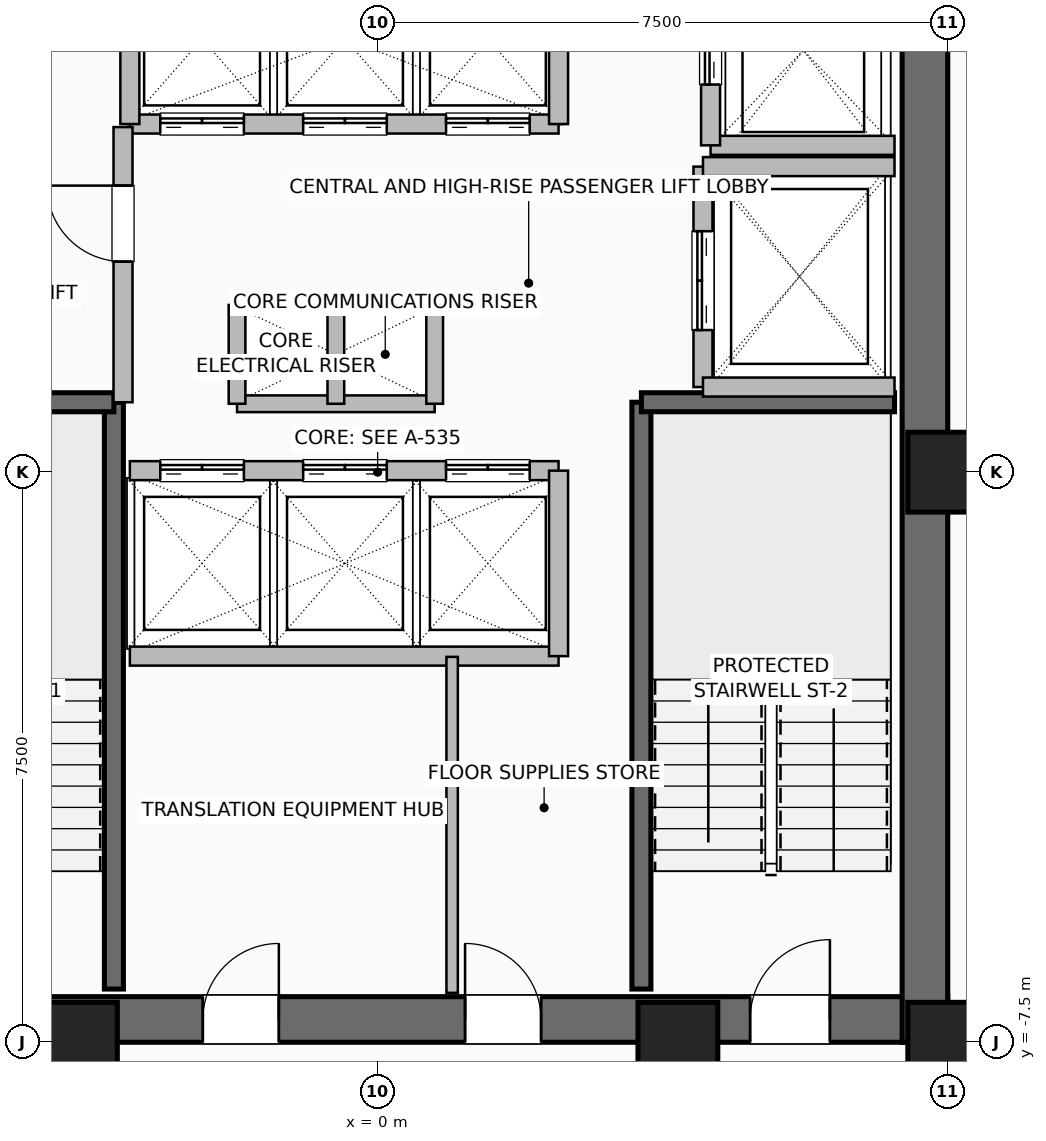
"""IFC4 building model, lengths in metres.
Left out: names, types, materials, properties, quantities, classifications, styles, units other than length and angle.
Written with IfcOpenShell. Run it as: python <this file> out.ifc"""

import sys

from ifc_helpers import new_model, si_unit, direction, frame, frame_2d, origin, origin_2d, place, context, subcontext, project, spatial, rectangle, hollow_rectangle, extrude, element, fill, save


model = new_model("IFC4")
c1 = context("Model", 3, precision=1e-05, world=origin(), true_north=direction((0.0, 1.0)))
c2 = subcontext(c1, "Body", "Model", "MODEL_VIEW")
j1 = project(units=[si_unit("LENGTHUNIT", "METRE"), si_unit("PLANEANGLEUNIT", "RADIAN")], contexts=[c1])
p1 = place(None, origin())
s1 = spatial("IfcSite", under=j1, at=p1, CompositionType="ELEMENT")
p2 = place(p1, origin())
s2 = spatial("IfcBuilding", under=s1, at=p2, CompositionType="ELEMENT")
p3 = place(p2, frame((0.0, 0.0, 133.6)))
s3 = spatial("IfcBuildingStorey", under=s2, at=p3, CompositionType="ELEMENT", Elevation=133.6)
for number, where, z_axis, x_axis in (
    (1, (-3.95, -7.5, 0.0), (0.0, 0.0, 1.0), (1.0, 0.0, 0.0)),
    (2, (3.95, -7.5, 0.0), (0.0, 0.0, 1.0), (1.0, 0.0, 0.0)),
    (3, (7.5, -7.5, 0.0), (0.0, 0.0, 1.0), (1.0, 0.0, 0.0)),
    (4, (7.5, 0.0, 0.0), (0.0, 0.0, 1.0), (1.0, 0.0, 0.0)),
):
    element("IfcColumn", number, at=place(p3, frame(where, z_axis=z_axis, x_axis=x_axis)), inside=s3, PredefinedType="COLUMN", context=c2, shape_type="SweptSolid", body=[
        extrude(hollow_rectangle(XDim=1.05, YDim=1.05, WallThickness=0.05, at=origin_2d()), origin(), (0.0, 0.0, 1.0), 3.6),
    ])
p4 = place(p3, frame((-7.5, -7.2, 0.0), z_axis=(0.0, 0.0, 1.0), x_axis=(1.0, 0.0, 0.0)))
e5 = element("IfcWall", 5, at=p4, inside=s3, PredefinedType="SHEAR", context=c2, shape_type="SweptSolid", body=[
    extrude(rectangle(XDim=15.0, YDim=0.6, at=frame_2d((7.5, 0.0))), origin(), (0.0, 0.0, 1.0), 3.36),
])
p5 = place(p4, frame((1.55, 0.0, 0.0)))
e6 = element("IfcOpeningElement", 6, at=p5, cuts=e5, PredefinedType="OPENING", context=c2, shape_type="SweptSolid", body=[
    extrude(rectangle(XDim=1.05, YDim=2.08, at=frame_2d((0.525, 1.04))), frame((0.0, 0.31, 0.0), z_axis=(0.0, -1.0, 0.0), x_axis=(1.0, 0.0, 0.0)), (0.0, 0.0, 1.0), 0.62),
])
p6 = place(p4, frame((12.4, 0.0, 0.0)))
e7 = element("IfcOpeningElement", 7, at=p6, cuts=e5, PredefinedType="OPENING", context=c2, shape_type="SweptSolid", body=[
    extrude(rectangle(XDim=1.05, YDim=2.08, at=frame_2d((0.525, 1.04))), frame((0.0, 0.31, 0.0), z_axis=(0.0, -1.0, 0.0), x_axis=(1.0, 0.0, 0.0)), (0.0, 0.0, 1.0), 0.62),
])
p7 = place(p4, frame((5.2, 0.0, 0.0)))
e8 = element("IfcOpeningElement", 8, at=p7, cuts=e5, PredefinedType="OPENING", context=c2, shape_type="SweptSolid", body=[
    extrude(rectangle(XDim=1.0, YDim=2.08, at=frame_2d((0.5, 1.04))), frame((0.0, 0.31, 0.0), z_axis=(0.0, -1.0, 0.0), x_axis=(1.0, 0.0, 0.0)), (0.0, 0.0, 1.0), 0.62),
])
p8 = place(p4, frame((8.65, 0.0, 0.0)))
e9 = element("IfcOpeningElement", 9, at=p8, cuts=e5, PredefinedType="OPENING", context=c2, shape_type="SweptSolid", body=[
    extrude(rectangle(XDim=1.0, YDim=2.08, at=frame_2d((0.5, 1.04))), frame((0.0, 0.31, 0.0), z_axis=(0.0, -1.0, 0.0), x_axis=(1.0, 0.0, 0.0)), (0.0, 0.0, 1.0), 0.62),
])
p9 = place(p3, frame((7.2, -7.5, 0.0), z_axis=(0.0, 0.0, 1.0), x_axis=(0.0, 1.0, 0.0)))
e10 = element("IfcWall", 10, at=p9, inside=s3, PredefinedType="SHEAR", context=c2, shape_type="SweptSolid", body=[
    extrude(rectangle(XDim=15.0, YDim=0.6, at=frame_2d((7.5, 0.0))), origin(), (0.0, 0.0, 1.0), 3.36),
])
p10 = place(p3, frame((-3.47, -6.8, 0.0), z_axis=(0.0, 0.0, 1.0), x_axis=(0.0, 1.0, 0.0)))
e11 = element("IfcWall", 11, at=p10, inside=s3, PredefinedType="SHEAR", context=c2, shape_type="SweptSolid", body=[
    extrude(rectangle(XDim=7.72, YDim=0.25, at=frame_2d((3.86, 0.0))), origin(), (0.0, 0.0, 1.0), 3.36),
])
p11 = place(p3, frame((-6.8, 0.92, 0.0), z_axis=(0.0, 0.0, 1.0), x_axis=(1.0, 0.0, 0.0)))
e12 = element("IfcWall", 12, at=p11, inside=s3, PredefinedType="SHEAR", context=c2, shape_type="SweptSolid", body=[
    extrude(rectangle(XDim=3.33, YDim=0.25, at=frame_2d((1.665, 0.0))), origin(), (0.0, 0.0, 1.0), 3.36),
])
p12 = place(p3, frame((3.47, -6.8, 0.0), z_axis=(0.0, 0.0, 1.0), x_axis=(0.0, 1.0, 0.0)))
e13 = element("IfcWall", 13, at=p12, inside=s3, PredefinedType="SHEAR", context=c2, shape_type="SweptSolid", body=[
    extrude(rectangle(XDim=7.72, YDim=0.25, at=frame_2d((3.86, 0.0))), origin(), (0.0, 0.0, 1.0), 3.36),
])
p13 = place(p3, frame((3.47, 0.92, 0.0), z_axis=(0.0, 0.0, 1.0), x_axis=(1.0, 0.0, 0.0)))
e14 = element("IfcWall", 14, at=p13, inside=s3, PredefinedType="SHEAR", context=c2, shape_type="SweptSolid", body=[
    extrude(rectangle(XDim=3.33, YDim=0.25, at=frame_2d((1.665, 0.0))), origin(), (0.0, 0.0, 1.0), 3.36),
])
for number, where, z_axis, x_axis in (
    (15, (-1.85, 2.2, 0.0), (0.0, 0.0, 1.0), (1.0, 0.0, 0.0)),
    (16, (-1.85, 0.9, 0.0), (0.0, 0.0, 1.0), (1.0, 0.0, 0.0)),
):
    element("IfcWall", number, at=place(p3, frame(where, z_axis=z_axis, x_axis=x_axis)), inside=s3, PredefinedType="PARTITIONING", context=c2, shape_type="SweptSolid", body=[
        extrude(rectangle(XDim=2.6, YDim=0.22, at=frame_2d((1.3, 0.0))), origin(), (0.0, 0.0, 1.0), 3.36),
    ])
for number, where, z_axis, x_axis in (
    (17, (-0.55, 0.9, 0.0), (0.0, 0.0, 1.0), (0.0, 1.0, 0.0)),
    (18, (0.75, 0.9, 0.0), (0.0, 0.0, 1.0), (0.0, 1.0, 0.0)),
    (19, (-1.85, 0.9, 0.0), (0.0, 0.0, 1.0), (0.0, 1.0, 0.0)),
):
    element("IfcWall", number, at=place(p3, frame(where, z_axis=z_axis, x_axis=x_axis)), inside=s3, PredefinedType="PARTITIONING", context=c2, shape_type="SweptSolid", body=[
        extrude(rectangle(XDim=1.3, YDim=0.22, at=frame_2d((0.65, 0.0))), origin(), (0.0, 0.0, 1.0), 3.36),
    ])
p14 = place(p3, frame((-3.26, 0.02, 0.0), z_axis=(0.0, 0.0, 1.0), x_axis=(1.0, 0.0, 0.0)))
e20 = element("IfcWall", 20, at=p14, inside=s3, PredefinedType="SHEAR", context=c2, shape_type="SweptSolid", body=[
    extrude(rectangle(XDim=5.64, YDim=0.25, at=frame_2d((2.82, 0.0))), origin(), (0.0, 0.0, 1.0), 3.36),
])
p15 = place(p14, frame((0.4, 0.0, 0.0)))
e21 = element("IfcOpeningElement", 21, at=p15, cuts=e20, PredefinedType="OPENING", context=c2, shape_type="SweptSolid", body=[
    extrude(rectangle(XDim=1.1, YDim=2.2, at=frame_2d((0.55, 1.1))), frame((0.0, 0.135, 0.0), z_axis=(0.0, -1.0, 0.0), x_axis=(1.0, 0.0, 0.0)), (0.0, 0.0, 1.0), 0.27),
])
p16 = place(p14, frame((2.28, 0.0, 0.0)))
e22 = element("IfcOpeningElement", 22, at=p16, cuts=e20, PredefinedType="OPENING", context=c2, shape_type="SweptSolid", body=[
    extrude(rectangle(XDim=1.1, YDim=2.2, at=frame_2d((0.55, 1.1))), frame((0.0, 0.135, 0.0), z_axis=(0.0, -1.0, 0.0), x_axis=(1.0, 0.0, 0.0)), (0.0, 0.0, 1.0), 0.27),
])
p17 = place(p14, frame((4.16, 0.0, 0.0)))
e23 = element("IfcOpeningElement", 23, at=p17, cuts=e20, PredefinedType="OPENING", context=c2, shape_type="SweptSolid", body=[
    extrude(rectangle(XDim=1.1, YDim=2.2, at=frame_2d((0.55, 1.1))), frame((0.0, 0.135, 0.0), z_axis=(0.0, -1.0, 0.0), x_axis=(1.0, 0.0, 0.0)), (0.0, 0.0, 1.0), 0.27),
])
p18 = place(p3, frame((-3.26, -2.42, 0.0), z_axis=(0.0, 0.0, 1.0), x_axis=(1.0, 0.0, 0.0)))
e24 = element("IfcWall", 24, at=p18, inside=s3, PredefinedType="SHEAR", context=c2, shape_type="SweptSolid", body=[
    extrude(rectangle(XDim=5.64, YDim=0.25, at=frame_2d((2.82, 0.0))), origin(), (0.0, 0.0, 1.0), 3.36),
])
p19 = place(p3, frame((2.38, -2.42, 0.0), z_axis=(0.0, 0.0, 1.0), x_axis=(0.0, 1.0, 0.0)))
e25 = element("IfcWall", 25, at=p19, inside=s3, PredefinedType="SHEAR", context=c2, shape_type="SweptSolid", body=[
    extrude(rectangle(XDim=2.44, YDim=0.25, at=frame_2d((1.22, 0.0))), origin(), (0.0, 0.0, 1.0), 3.36),
])
p20 = place(p3, frame((-3.26, 4.58, 0.0), z_axis=(0.0, 0.0, 1.0), x_axis=(1.0, 0.0, 0.0)))
e26 = element("IfcWall", 26, at=p20, inside=s3, PredefinedType="SHEAR", context=c2, shape_type="SweptSolid", body=[
    extrude(rectangle(XDim=5.64, YDim=0.25, at=frame_2d((2.82, 0.0))), origin(), (0.0, 0.0, 1.0), 3.36),
])
p21 = place(p20, frame((0.4, 0.0, 0.0)))
e27 = element("IfcOpeningElement", 27, at=p21, cuts=e26, PredefinedType="OPENING", context=c2, shape_type="SweptSolid", body=[
    extrude(rectangle(XDim=1.1, YDim=2.2, at=frame_2d((0.55, 1.1))), frame((0.0, 0.135, 0.0), z_axis=(0.0, -1.0, 0.0), x_axis=(1.0, 0.0, 0.0)), (0.0, 0.0, 1.0), 0.27),
])
p22 = place(p20, frame((2.28, 0.0, 0.0)))
e28 = element("IfcOpeningElement", 28, at=p22, cuts=e26, PredefinedType="OPENING", context=c2, shape_type="SweptSolid", body=[
    extrude(rectangle(XDim=1.1, YDim=2.2, at=frame_2d((0.55, 1.1))), frame((0.0, 0.135, 0.0), z_axis=(0.0, -1.0, 0.0), x_axis=(1.0, 0.0, 0.0)), (0.0, 0.0, 1.0), 0.27),
])
p23 = place(p20, frame((4.16, 0.0, 0.0)))
e29 = element("IfcOpeningElement", 29, at=p23, cuts=e26, PredefinedType="OPENING", context=c2, shape_type="SweptSolid", body=[
    extrude(rectangle(XDim=1.1, YDim=2.2, at=frame_2d((0.55, 1.1))), frame((0.0, 0.135, 0.0), z_axis=(0.0, -1.0, 0.0), x_axis=(1.0, 0.0, 0.0)), (0.0, 0.0, 1.0), 0.27),
])
for number, where, z_axis, x_axis in (
    (30, (-3.26, 4.58, 0.0), (0.0, 0.0, 1.0), (0.0, 1.0, 0.0)),
    (31, (2.38, 4.58, 0.0), (0.0, 0.0, 1.0), (0.0, 1.0, 0.0)),
):
    element("IfcWall", number, at=place(p3, frame(where, z_axis=z_axis, x_axis=x_axis)), inside=s3, PredefinedType="SHEAR", context=c2, shape_type="SweptSolid", body=[
        extrude(rectangle(XDim=2.22, YDim=0.25, at=frame_2d((1.11, 0.0))), origin(), (0.0, 0.0, 1.0), 3.36),
    ])
p24 = place(p3, frame((4.38, 4.3, 0.0), z_axis=(0.0, 0.0, 1.0), x_axis=(1.0, 0.0, 0.0)))
e32 = element("IfcWall", 32, at=p24, inside=s3, PredefinedType="SHEAR", context=c2, shape_type="SweptSolid", body=[
    extrude(rectangle(XDim=2.42, YDim=0.25, at=frame_2d((1.21, 0.0))), origin(), (0.0, 0.0, 1.0), 3.36),
])
p25 = place(p3, frame((4.38, 4.3, 0.0), z_axis=(0.0, 0.0, 1.0), x_axis=(0.0, 1.0, 0.0)))
e33 = element("IfcWall", 33, at=p25, inside=s3, PredefinedType="SHEAR", context=c2, shape_type="SweptSolid", body=[
    extrude(rectangle(XDim=2.5, YDim=0.25, at=frame_2d((1.25, 0.0))), origin(), (0.0, 0.0, 1.0), 3.36),
])
p26 = place(p25, frame((0.8, 0.0, 0.0)))
e34 = element("IfcOpeningElement", 34, at=p26, cuts=e33, PredefinedType="OPENING", context=c2, shape_type="SweptSolid", body=[
    extrude(rectangle(XDim=1.2, YDim=2.2, at=frame_2d((0.6, 1.1))), frame((0.0, 0.135, 0.0), z_axis=(0.0, -1.0, 0.0), x_axis=(1.0, 0.0, 0.0)), (0.0, 0.0, 1.0), 0.27),
])
p27 = place(p3, frame((4.28, 1.12, 0.0), z_axis=(0.0, 0.0, 1.0), x_axis=(0.0, 1.0, 0.0)))
e35 = element("IfcWall", 35, at=p27, inside=s3, PredefinedType="SHEAR", context=c2, shape_type="SweptSolid", body=[
    extrude(rectangle(XDim=2.9, YDim=0.25, at=frame_2d((1.45, 0.0))), origin(), (0.0, 0.0, 1.0), 3.36),
])
p28 = place(p27, frame((0.75, 0.0, 0.0)))
e36 = element("IfcOpeningElement", 36, at=p28, cuts=e35, PredefinedType="OPENING", context=c2, shape_type="SweptSolid", body=[
    extrude(rectangle(XDim=1.3, YDim=2.3, at=frame_2d((0.65, 1.15))), frame((0.0, 0.135, 0.0), z_axis=(0.0, -1.0, 0.0), x_axis=(1.0, 0.0, 0.0)), (0.0, 0.0, 1.0), 0.27),
])
for number, where, z_axis, x_axis in (
    (37, (4.28, 1.12, 0.0), (0.0, 0.0, 1.0), (1.0, 0.0, 0.0)),
    (38, (4.28, 4.02, 0.0), (0.0, 0.0, 1.0), (1.0, 0.0, 0.0)),
):
    element("IfcWall", number, at=place(p3, frame(where, z_axis=z_axis, x_axis=x_axis)), inside=s3, PredefinedType="SHEAR", context=c2, shape_type="SweptSolid", body=[
        extrude(rectangle(XDim=2.52, YDim=0.25, at=frame_2d((1.26, 0.0))), origin(), (0.0, 0.0, 1.0), 3.36),
    ])
p29 = place(p3, frame((-3.35, 0.92, 0.0), z_axis=(0.0, 0.0, 1.0), x_axis=(0.0, 1.0, 0.0)))
e39 = element("IfcWall", 39, at=p29, inside=s3, PredefinedType="SHEAR", context=c2, shape_type="SweptSolid", body=[
    extrude(rectangle(XDim=3.62, YDim=0.25, at=frame_2d((1.81, 0.0))), origin(), (0.0, 0.0, 1.0), 3.36),
])
p30 = place(p29, frame((1.85, 0.0, 0.0)))
e40 = element("IfcOpeningElement", 40, at=p30, cuts=e39, PredefinedType="OPENING", context=c2, shape_type="SweptSolid", body=[
    extrude(rectangle(XDim=1.0, YDim=2.08, at=frame_2d((0.5, 1.04))), frame((0.0, 0.135, 0.0), z_axis=(0.0, -1.0, 0.0), x_axis=(1.0, 0.0, 0.0)), (0.0, 0.0, 1.0), 0.27),
])
p31 = place(p3, frame((0.98, -6.85, 0.0), z_axis=(0.0, 0.0, 1.0), x_axis=(0.0, 1.0, 0.0)))
e41 = element("IfcWall", 41, at=p31, inside=s3, PredefinedType="PARTITIONING", context=c2, shape_type="SweptSolid", body=[
    extrude(rectangle(XDim=4.42, YDim=0.15, at=frame_2d((2.21, 0.0))), origin(), (0.0, 0.0, 1.0), 3.36),
])
p32 = place(p3, frame((7.45, -7.48, 0.0), z_axis=(0.0, 0.0, 1.0), x_axis=(1.0, 0.0, 0.0)))
e42 = element("IfcWall", 42, at=p32, inside=s3, PredefinedType="PARTITIONING", context=c2, shape_type="SweptSolid", body=[
    extrude(rectangle(XDim=0.95, YDim=0.15, at=frame_2d((0.475, 0.0))), origin(), (0.0, 0.0, 1.0), 3.36),
])
p33 = place(p6, origin())
e43 = element("IfcDoor", 43, at=p33, inside=s3, OperationType="SINGLE_SWING_RIGHT", PredefinedType="DOOR", context=c2, shape_type="SweptSolid", body=[
    extrude(rectangle(XDim=1.05, YDim=2.08, at=frame_2d((0.525, 1.04))), frame((0.0, 0.025, 0.0), z_axis=(0.0, -1.0, 0.0), x_axis=(1.0, 0.0, 0.0)), (0.0, 0.0, 1.0), 0.05),
])
fill(e7, e43)
p34 = place(p7, origin())
e44 = element("IfcDoor", 44, at=p34, inside=s3, OperationType="SINGLE_SWING_RIGHT", PredefinedType="DOOR", context=c2, shape_type="SweptSolid", body=[
    extrude(rectangle(XDim=1.0, YDim=2.08, at=frame_2d((0.5, 1.04))), frame((0.0, 0.025, 0.0), z_axis=(0.0, -1.0, 0.0), x_axis=(1.0, 0.0, 0.0)), (0.0, 0.0, 1.0), 0.05),
])
fill(e8, e44)
p35 = place(p8, origin())
e45 = element("IfcDoor", 45, at=p35, inside=s3, OperationType="SINGLE_SWING_LEFT", PredefinedType="DOOR", context=c2, shape_type="SweptSolid", body=[
    extrude(rectangle(XDim=1.0, YDim=2.08, at=frame_2d((0.5, 1.04))), frame((0.0, 0.025, 0.0), z_axis=(0.0, -1.0, 0.0), x_axis=(1.0, 0.0, 0.0)), (0.0, 0.0, 1.0), 0.05),
])
fill(e9, e45)
p36 = place(p15, origin())
e46 = element("IfcDoor", 46, at=p36, inside=s3, OperationType="DOUBLE_DOOR_SLIDING", PredefinedType="DOOR", context=c2, shape_type="SweptSolid", body=[
    extrude(rectangle(XDim=1.1, YDim=2.2, at=frame_2d((0.55, 1.1))), frame((0.0, 0.025, 0.0), z_axis=(0.0, -1.0, 0.0), x_axis=(1.0, 0.0, 0.0)), (0.0, 0.0, 1.0), 0.05),
])
fill(e21, e46)
p37 = place(p16, origin())
e47 = element("IfcDoor", 47, at=p37, inside=s3, OperationType="DOUBLE_DOOR_SLIDING", PredefinedType="DOOR", context=c2, shape_type="SweptSolid", body=[
    extrude(rectangle(XDim=1.1, YDim=2.2, at=frame_2d((0.55, 1.1))), frame((0.0, 0.025, 0.0), z_axis=(0.0, -1.0, 0.0), x_axis=(1.0, 0.0, 0.0)), (0.0, 0.0, 1.0), 0.05),
])
fill(e22, e47)
p38 = place(p17, origin())
e48 = element("IfcDoor", 48, at=p38, inside=s3, OperationType="DOUBLE_DOOR_SLIDING", PredefinedType="DOOR", context=c2, shape_type="SweptSolid", body=[
    extrude(rectangle(XDim=1.1, YDim=2.2, at=frame_2d((0.55, 1.1))), frame((0.0, 0.025, 0.0), z_axis=(0.0, -1.0, 0.0), x_axis=(1.0, 0.0, 0.0)), (0.0, 0.0, 1.0), 0.05),
])
fill(e23, e48)
p39 = place(p21, origin())
e49 = element("IfcDoor", 49, at=p39, inside=s3, OperationType="DOUBLE_DOOR_SLIDING", PredefinedType="DOOR", context=c2, shape_type="SweptSolid", body=[
    extrude(rectangle(XDim=1.1, YDim=2.2, at=frame_2d((0.55, 1.1))), frame((0.0, 0.025, 0.0), z_axis=(0.0, -1.0, 0.0), x_axis=(1.0, 0.0, 0.0)), (0.0, 0.0, 1.0), 0.05),
])
fill(e27, e49)
p40 = place(p22, origin())
e50 = element("IfcDoor", 50, at=p40, inside=s3, OperationType="DOUBLE_DOOR_SLIDING", PredefinedType="DOOR", context=c2, shape_type="SweptSolid", body=[
    extrude(rectangle(XDim=1.1, YDim=2.2, at=frame_2d((0.55, 1.1))), frame((0.0, 0.025, 0.0), z_axis=(0.0, -1.0, 0.0), x_axis=(1.0, 0.0, 0.0)), (0.0, 0.0, 1.0), 0.05),
])
fill(e28, e50)
p41 = place(p23, origin())
e51 = element("IfcDoor", 51, at=p41, inside=s3, OperationType="DOUBLE_DOOR_SLIDING", PredefinedType="DOOR", context=c2, shape_type="SweptSolid", body=[
    extrude(rectangle(XDim=1.1, YDim=2.2, at=frame_2d((0.55, 1.1))), frame((0.0, 0.025, 0.0), z_axis=(0.0, -1.0, 0.0), x_axis=(1.0, 0.0, 0.0)), (0.0, 0.0, 1.0), 0.05),
])
fill(e29, e51)
p42 = place(p26, origin())
e52 = element("IfcDoor", 52, at=p42, inside=s3, OperationType="DOUBLE_DOOR_SLIDING", PredefinedType="DOOR", context=c2, shape_type="SweptSolid", body=[
    extrude(rectangle(XDim=1.2, YDim=2.2, at=frame_2d((0.6, 1.1))), frame((0.0, 0.025, 0.0), z_axis=(0.0, -1.0, 0.0), x_axis=(1.0, 0.0, 0.0)), (0.0, 0.0, 1.0), 0.05),
])
fill(e34, e52)
p43 = place(p28, origin())
e53 = element("IfcDoor", 53, at=p43, inside=s3, OperationType="DOUBLE_DOOR_SLIDING", PredefinedType="DOOR", context=c2, shape_type="SweptSolid", body=[
    extrude(rectangle(XDim=1.3, YDim=2.3, at=frame_2d((0.65, 1.15))), frame((0.0, 0.025, 0.0), z_axis=(0.0, -1.0, 0.0), x_axis=(1.0, 0.0, 0.0)), (0.0, 0.0, 1.0), 0.05),
])
fill(e36, e53)
p44 = place(p30, origin())
e54 = element("IfcDoor", 54, at=p44, inside=s3, OperationType="SINGLE_SWING_RIGHT", PredefinedType="DOOR", context=c2, shape_type="SweptSolid", body=[
    extrude(rectangle(XDim=1.0, YDim=2.08, at=frame_2d((0.5, 1.04))), frame((0.0, 0.025, 0.0), z_axis=(0.0, -1.0, 0.0), x_axis=(1.0, 0.0, 0.0)), (0.0, 0.0, 1.0), 0.05),
])
fill(e40, e54)
save(model, sys.argv[1])
